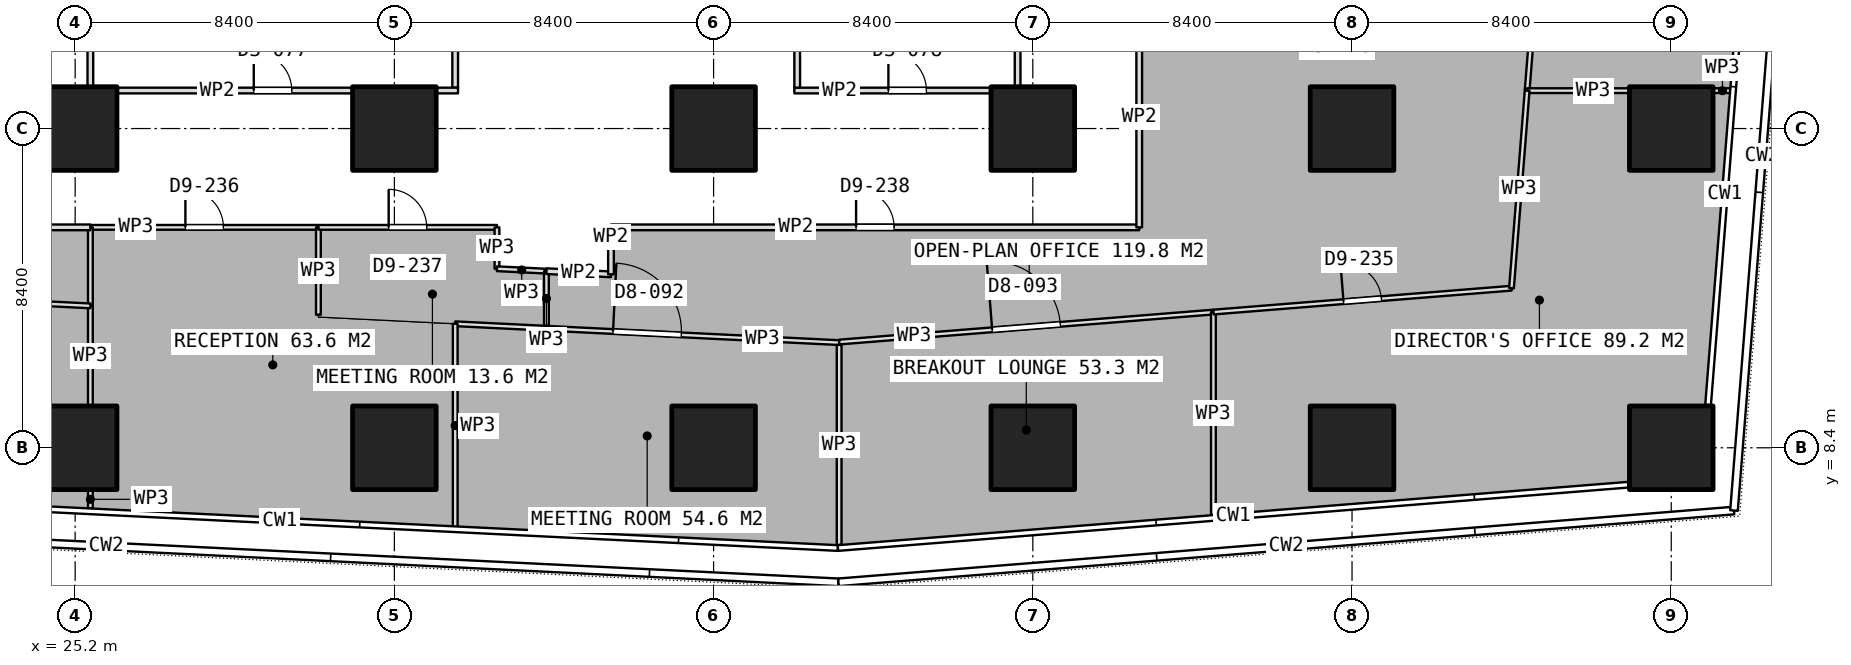
"""IFC4 building model, lengths in metres.
Left out: names, types, materials, properties, quantities, classifications, styles, units other than length and angle.
Written with IfcOpenShell. Run it as: python <this file> out.ifc"""

import sys

from ifc_helpers import new_model, si_unit, direction, frame, frame_2d, origin, origin_2d, place, context, subcontext, project, spatial, rectangle, extrude, element, fill, save


model = new_model("IFC4")
c1 = context("Model", 3, precision=1e-05, world=origin(), true_north=direction((0.0, 1.0)))
c2 = subcontext(c1, "Body", "Model", "MODEL_VIEW")
j1 = project(units=[si_unit("LENGTHUNIT", "METRE"), si_unit("PLANEANGLEUNIT", "RADIAN")], contexts=[c1])
p1 = place(None, origin())
s1 = spatial("IfcSite", under=j1, at=p1, CompositionType="ELEMENT")
p2 = place(p1, origin())
s2 = spatial("IfcBuilding", under=s1, at=p2, CompositionType="ELEMENT")
p3 = place(p2, frame((0.0, 0.0, 70.4)))
s3 = spatial("IfcBuildingStorey", under=s2, at=p3, CompositionType="ELEMENT", Elevation=70.4)
for number, where, z_axis, x_axis in (
    (1, (25.2, 8.4, 0.0), (0.0, 0.0, 1.0), (1.0, 0.0, 0.0)),
    (2, (25.2, 16.8, 0.0), (0.0, 0.0, 1.0), (1.0, 0.0, 0.0)),
    (3, (33.6, 8.4, 0.0), (0.0, 0.0, 1.0), (1.0, 0.0, 0.0)),
    (4, (33.6, 16.8, 0.0), (0.0, 0.0, 1.0), (1.0, 0.0, 0.0)),
    (5, (42.0, 8.4, 0.0), (0.0, 0.0, 1.0), (1.0, 0.0, 0.0)),
    (6, (42.0, 16.8, 0.0), (0.0, 0.0, 1.0), (1.0, 0.0, 0.0)),
    (7, (50.4, 8.4, 0.0), (0.0, 0.0, 1.0), (1.0, 0.0, 0.0)),
    (8, (50.4, 16.8, 0.0), (0.0, 0.0, 1.0), (1.0, 0.0, 0.0)),
    (9, (58.8, 8.4, 0.0), (0.0, 0.0, 1.0), (1.0, 0.0, 0.0)),
    (10, (58.8, 16.8, 0.0), (0.0, 0.0, 1.0), (1.0, 0.0, 0.0)),
    (11, (67.2, 8.4, 0.0), (0.0, 0.0, 1.0), (1.0, 0.0, 0.0)),
    (12, (67.2, 16.8, 0.0), (0.0, 0.0, 1.0), (1.0, 0.0, 0.0)),
):
    element("IfcColumn", number, at=place(p3, frame(where, z_axis=z_axis, x_axis=x_axis)), inside=s3, PredefinedType="COLUMN", context=c2, shape_type="SweptSolid", body=[
        extrude(rectangle(XDim=2.2, YDim=2.2, at=origin_2d()), origin(), (0.0, 0.0, 1.0), 3.75),
    ])
p4 = place(p3, frame((25.525, 17.8, 0.0), z_axis=(0.0, 0.0, 1.0), x_axis=(1.0, 0.0, 0.0)))
e13 = element("IfcWall", 13, at=p4, inside=s3, PredefinedType="PARTITIONING", context=c2, shape_type="SweptSolid", body=[
    extrude(rectangle(XDim=9.75, YDim=0.15, at=frame_2d((4.875, 0.0))), origin(), (0.0, 0.0, 1.0), 3.5),
])
p5 = place(p4, frame((4.375, 0.0, 0.0)))
e14 = element("IfcOpeningElement", 14, at=p5, cuts=e13, PredefinedType="OPENING", context=c2, shape_type="SweptSolid", body=[
    extrude(rectangle(XDim=1.0, YDim=2.1, at=frame_2d((0.5, 1.05))), frame((0.0, 0.085, 0.0), z_axis=(0.0, -1.0, 0.0), x_axis=(1.0, 0.0, 0.0)), (0.0, 0.0, 1.0), 0.17),
])
for number, where, z_axis, x_axis in (
    (15, (25.6, 17.875, 0.0), (0.0, 0.0, 1.0), (0.0, 1.0, 0.0)),
    (16, (35.2, 17.875, 0.0), (0.0, 0.0, 1.0), (0.0, 1.0, 0.0)),
):
    element("IfcWall", number, at=place(p3, frame(where, z_axis=z_axis, x_axis=x_axis)), inside=s3, PredefinedType="PARTITIONING", context=c2, shape_type="SweptSolid", body=[
        extrude(rectangle(XDim=2.575, YDim=0.15, at=frame_2d((1.288, 0.0))), origin(), (0.0, 0.0, 1.0), 3.5),
    ])
p6 = place(p3, frame((44.125, 17.8, 0.0), z_axis=(0.0, 0.0, 1.0), x_axis=(1.0, 0.0, 0.0)))
e17 = element("IfcWall", 17, at=p6, inside=s3, PredefinedType="PARTITIONING", context=c2, shape_type="SweptSolid", body=[
    extrude(rectangle(XDim=5.95, YDim=0.15, at=frame_2d((2.975, 0.0))), origin(), (0.0, 0.0, 1.0), 3.5),
])
p7 = place(p6, frame((2.475, 0.0, 0.0)))
e18 = element("IfcOpeningElement", 18, at=p7, cuts=e17, PredefinedType="OPENING", context=c2, shape_type="SweptSolid", body=[
    extrude(rectangle(XDim=1.0, YDim=2.1, at=frame_2d((0.5, 1.05))), frame((0.0, 0.085, 0.0), z_axis=(0.0, -1.0, 0.0), x_axis=(1.0, 0.0, 0.0)), (0.0, 0.0, 1.0), 0.17),
])
for number, where, z_axis, x_axis in (
    (19, (44.2, 17.875, 0.0), (0.0, 0.0, 1.0), (0.0, 1.0, 0.0)),
    (20, (50.0, 17.875, 0.0), (0.0, 0.0, 1.0), (0.0, 1.0, 0.0)),
):
    element("IfcWall", number, at=place(p3, frame(where, z_axis=z_axis, x_axis=x_axis)), inside=s3, PredefinedType="PARTITIONING", context=c2, shape_type="SweptSolid", body=[
        extrude(rectangle(XDim=2.575, YDim=0.15, at=frame_2d((1.288, 0.0))), origin(), (0.0, 0.0, 1.0), 3.5),
    ])
p8 = place(p3, frame((35.201, 11.663, 0.0), z_axis=(0.0, 0.0, 1.0), x_axis=(0.998797064432, -0.049034927155, 0.0)))
e21 = element("IfcWall", 21, at=p8, inside=s3, PredefinedType="PARTITIONING", context=c2, shape_type="SweptSolid", body=[
    extrude(rectangle(XDim=10.117, YDim=0.125, at=frame_2d((5.059, 0.0))), origin(), (0.0, 0.0, 1.0), 3.5),
])
p9 = place(p8, frame((4.158, 0.0, 0.0)))
e22 = element("IfcOpeningElement", 22, at=p9, cuts=e21, PredefinedType="OPENING", context=c2, shape_type="SweptSolid", body=[
    extrude(rectangle(XDim=1.8, YDim=2.1, at=frame_2d((0.9, 1.05))), frame((0.0, 0.073, 0.0), z_axis=(0.0, -1.0, 0.0), x_axis=(1.0, 0.0, 0.0)), (0.0, 0.0, 1.0), 0.145),
])
p10 = place(p3, frame((45.304, 11.107, 0.0), z_axis=(0.0, 0.0, 1.0), x_axis=(0.0, -1.0, 0.0)))
e23 = element("IfcWall", 23, at=p10, inside=s3, PredefinedType="PARTITIONING", context=c2, shape_type="SweptSolid", body=[
    extrude(rectangle(XDim=5.262, YDim=0.125, at=frame_2d((2.631, 0.0))), origin(), (0.0, 0.0, 1.0), 3.5),
])
p11 = place(p3, frame((35.201, 6.307, 0.0), z_axis=(0.0, 0.0, 1.0), x_axis=(0.0, 1.0, 0.0)))
e24 = element("IfcWall", 24, at=p11, inside=s3, PredefinedType="PARTITIONING", context=c2, shape_type="SweptSolid", body=[
    extrude(rectangle(XDim=5.356, YDim=0.125, at=frame_2d((2.678, 0.0))), origin(), (0.0, 0.0, 1.0), 3.5),
])
p12 = place(p3, frame((45.307, 11.182, 0.0), z_axis=(0.0, 0.0, 1.0), x_axis=(0.996803635633, 0.079890625164, 0.0)))
e25 = element("IfcWall", 25, at=p12, inside=s3, PredefinedType="PARTITIONING", context=c2, shape_type="SweptSolid", body=[
    extrude(rectangle(XDim=9.877, YDim=0.125, at=frame_2d((4.938, 0.0))), origin(), (0.0, 0.0, 1.0), 3.5),
])
p13 = place(p12, frame((4.037, 0.0, 0.0)))
e26 = element("IfcOpeningElement", 26, at=p13, cuts=e25, PredefinedType="OPENING", context=c2, shape_type="SweptSolid", body=[
    extrude(rectangle(XDim=1.8, YDim=2.1, at=frame_2d((0.9, 1.05))), frame((0.0, 0.073, 0.0), z_axis=(0.0, -1.0, 0.0), x_axis=(1.0, 0.0, 0.0)), (0.0, 0.0, 1.0), 0.145),
])
p14 = place(p3, frame((55.152, 11.971, 0.0), z_axis=(0.0, 0.0, 1.0), x_axis=(0.0, -1.0, 0.0)))
e27 = element("IfcWall", 27, at=p14, inside=s3, PredefinedType="PARTITIONING", context=c2, shape_type="SweptSolid", body=[
    extrude(rectangle(XDim=5.337, YDim=0.125, at=frame_2d((2.668, 0.0))), origin(), (0.0, 0.0, 1.0), 3.5),
])
p15 = place(p3, frame((63.408, 17.797, 0.0), z_axis=(0.0, 0.0, 1.0), x_axis=(1.0, 0.0, 0.0)))
e28 = element("IfcWall", 28, at=p15, inside=s3, PredefinedType="PARTITIONING", context=c2, shape_type="SweptSolid", body=[
    extrude(rectangle(XDim=2.672, YDim=0.125, at=frame_2d((1.336, 0.0))), origin(), (0.0, 0.0, 1.0), 3.5),
])
p16 = place(p3, frame((68.32, 17.797, 0.0), z_axis=(0.0, 0.0, 1.0), x_axis=(1.0, 0.0, 0.0)))
e29 = element("IfcWall", 29, at=p16, inside=s3, PredefinedType="PARTITIONING", context=c2, shape_type="SweptSolid", body=[
    extrude(rectangle(XDim=0.455, YDim=0.125, at=frame_2d((0.228, 0.0))), origin(), (0.0, 0.0, 1.0), 3.5),
])
p17 = place(p3, frame((55.153, 11.971, 0.0), z_axis=(0.0, 0.0, 1.0), x_axis=(0.996807874633, 0.079837717087, 0.0)))
e30 = element("IfcWall", 30, at=p17, inside=s3, PredefinedType="PARTITIONING", context=c2, shape_type="SweptSolid", body=[
    extrude(rectangle(XDim=7.868, YDim=0.125, at=frame_2d((3.934, 0.0))), origin(), (0.0, 0.0, 1.0), 3.5),
])
p18 = place(p17, frame((3.434, 0.0, 0.0)))
e31 = element("IfcOpeningElement", 31, at=p18, cuts=e30, PredefinedType="OPENING", context=c2, shape_type="SweptSolid", body=[
    extrude(rectangle(XDim=1.0, YDim=2.1, at=frame_2d((0.5, 1.05))), frame((0.0, 0.073, 0.0), z_axis=(0.0, -1.0, 0.0), x_axis=(1.0, 0.0, 0.0)), (0.0, 0.0, 1.0), 0.145),
])
p19 = place(p3, frame((62.996, 12.599, 0.0), z_axis=(0.0, 0.0, 1.0), x_axis=(0.078987793385, 0.996875583258, 0.0)))
e32 = element("IfcWall", 32, at=p19, inside=s3, PredefinedType="PARTITIONING", context=c2, shape_type="SweptSolid", body=[
    extrude(rectangle(XDim=5.214, YDim=0.125, at=frame_2d((2.607, 0.0))), origin(), (0.0, 0.0, 1.0), 3.5),
])
p20 = place(p3, frame((63.408, 17.798, 0.0), z_axis=(0.0, 0.0, 1.0), x_axis=(0.079179009267, 0.996860413745, 0.0)))
e33 = element("IfcWall", 33, at=p20, inside=s3, PredefinedType="PARTITIONING", context=c2, shape_type="SweptSolid", body=[
    extrude(rectangle(XDim=2.211, YDim=0.125, at=frame_2d((1.105, 0.0))), origin(), (0.0, 0.0, 1.0), 3.5),
])
p21 = place(p3, frame((25.601, 6.808, 0.0), z_axis=(0.0, 0.0, 1.0), x_axis=(0.0, 1.0, 0.0)))
e34 = element("IfcWall", 34, at=p21, inside=s3, PredefinedType="PARTITIONING", context=c2, shape_type="SweptSolid", body=[
    extrude(rectangle(XDim=0.472, YDim=0.125, at=frame_2d((0.236, 0.0))), origin(), (0.0, 0.0, 1.0), 3.5),
])
p22 = place(p3, frame((25.601, 9.52, 0.0), z_axis=(0.0, 0.0, 1.0), x_axis=(0.0, 1.0, 0.0)))
e35 = element("IfcWall", 35, at=p22, inside=s3, PredefinedType="PARTITIONING", context=c2, shape_type="SweptSolid", body=[
    extrude(rectangle(XDim=2.614, YDim=0.125, at=frame_2d((1.307, 0.0))), origin(), (0.0, 0.0, 1.0), 3.5),
])
p23 = place(p3, frame((25.601, 14.2, 0.0), z_axis=(0.0, 0.0, 1.0), x_axis=(1.0, 0.0, 0.0)))
e36 = element("IfcWall", 36, at=p23, inside=s3, PredefinedType="PARTITIONING", context=c2, shape_type="SweptSolid", body=[
    extrude(rectangle(XDim=6.0, YDim=0.125, at=frame_2d((3.0, 0.0))), origin(), (0.0, 0.0, 1.0), 3.5),
])
p24 = place(p23, frame((2.5, 0.0, 0.0)))
e37 = element("IfcOpeningElement", 37, at=p24, cuts=e36, PredefinedType="OPENING", context=c2, shape_type="SweptSolid", body=[
    extrude(rectangle(XDim=1.0, YDim=2.1, at=frame_2d((0.5, 1.05))), frame((0.0, 0.073, 0.0), z_axis=(0.0, -1.0, 0.0), x_axis=(1.0, 0.0, 0.0)), (0.0, 0.0, 1.0), 0.145),
])
p25 = place(p3, frame((31.601, 14.2, 0.0), z_axis=(0.0, 0.0, 1.0), x_axis=(0.0, -1.0, 0.0)))
e38 = element("IfcWall", 38, at=p25, inside=s3, PredefinedType="PARTITIONING", context=c2, shape_type="SweptSolid", body=[
    extrude(rectangle(XDim=2.298, YDim=0.125, at=frame_2d((1.149, 0.0))), origin(), (0.0, 0.0, 1.0), 3.5),
])
p26 = place(p3, frame((25.601, 12.134, 0.0), z_axis=(0.0, 0.0, 1.0), x_axis=(0.0, 1.0, 0.0)))
e39 = element("IfcWall", 39, at=p26, inside=s3, PredefinedType="PARTITIONING", context=c2, shape_type="SweptSolid", body=[
    extrude(rectangle(XDim=2.066, YDim=0.125, at=frame_2d((1.033, 0.0))), origin(), (0.0, 0.0, 1.0), 3.5),
])
p27 = place(p3, frame((31.601, 14.2, 0.0), z_axis=(0.0, 0.0, 1.0), x_axis=(1.0, 0.0, 0.0)))
e40 = element("IfcWall", 40, at=p27, inside=s3, PredefinedType="PARTITIONING", context=c2, shape_type="SweptSolid", body=[
    extrude(rectangle(XDim=4.699, YDim=0.125, at=frame_2d((2.35, 0.0))), origin(), (0.0, 0.0, 1.0), 3.5),
])
p28 = place(p27, frame((1.849, 0.0, 0.0)))
e41 = element("IfcOpeningElement", 41, at=p28, cuts=e40, PredefinedType="OPENING", context=c2, shape_type="SweptSolid", body=[
    extrude(rectangle(XDim=1.0, YDim=2.1, at=frame_2d((0.5, 1.05))), frame((0.0, 0.073, 0.0), z_axis=(0.0, -1.0, 0.0), x_axis=(1.0, 0.0, 0.0)), (0.0, 0.0, 1.0), 0.145),
])
p29 = place(p3, frame((36.3, 14.2, 0.0), z_axis=(0.0, 0.0, 1.0), x_axis=(0.0, -1.0, 0.0)))
e42 = element("IfcWall", 42, at=p29, inside=s3, PredefinedType="PARTITIONING", context=c2, shape_type="SweptSolid", body=[
    extrude(rectangle(XDim=1.089, YDim=0.125, at=frame_2d((0.544, 0.0))), origin(), (0.0, 0.0, 1.0), 3.5),
])
p30 = place(p3, frame((36.3, 13.111, 0.0), z_axis=(0.0, 0.0, 1.0), x_axis=(0.998793590669, -0.049105633469, 0.0)))
e43 = element("IfcWall", 43, at=p30, inside=s3, PredefinedType="PARTITIONING", context=c2, shape_type="SweptSolid", body=[
    extrude(rectangle(XDim=1.302, YDim=0.125, at=frame_2d((0.651, 0.0))), origin(), (0.0, 0.0, 1.0), 3.5),
])
p31 = place(p3, frame((37.601, 13.047, 0.0), z_axis=(0.0, 0.0, 1.0), x_axis=(0.0, -1.0, 0.0)))
e44 = element("IfcWall", 44, at=p31, inside=s3, PredefinedType="PARTITIONING", context=c2, shape_type="SweptSolid", body=[
    extrude(rectangle(XDim=1.439, YDim=0.125, at=frame_2d((0.72, 0.0))), origin(), (0.0, 0.0, 1.0), 3.5),
])
p32 = place(p3, frame((37.601, 13.047, 0.0), z_axis=(0.0, 0.0, 1.0), x_axis=(0.998808600268, -0.048799385557, 0.0)))
e45 = element("IfcWall", 45, at=p32, inside=s3, PredefinedType="PARTITIONING", context=c2, shape_type="SweptSolid", body=[
    extrude(rectangle(XDim=1.701, YDim=0.15, at=frame_2d((0.851, 0.0))), origin(), (0.0, 0.0, 1.0), 3.5),
])
p33 = place(p3, frame((39.3, 12.964, 0.0), z_axis=(0.0, 0.0, 1.0), x_axis=(0.0, 1.0, 0.0)))
e46 = element("IfcWall", 46, at=p33, inside=s3, PredefinedType="PARTITIONING", context=c2, shape_type="SweptSolid", body=[
    extrude(rectangle(XDim=1.236, YDim=0.15, at=frame_2d((0.618, 0.0))), origin(), (0.0, 0.0, 1.0), 3.5),
])
p34 = place(p3, frame((39.3, 14.2, 0.0), z_axis=(0.0, 0.0, 1.0), x_axis=(1.0, 0.0, 0.0)))
e47 = element("IfcWall", 47, at=p34, inside=s3, PredefinedType="PARTITIONING", context=c2, shape_type="SweptSolid", body=[
    extrude(rectangle(XDim=13.9, YDim=0.15, at=frame_2d((6.95, 0.0))), origin(), (0.0, 0.0, 1.0), 3.5),
])
p35 = place(p34, frame((6.45, 0.0, 0.0)))
e48 = element("IfcOpeningElement", 48, at=p35, cuts=e47, PredefinedType="OPENING", context=c2, shape_type="SweptSolid", body=[
    extrude(rectangle(XDim=1.0, YDim=2.1, at=frame_2d((0.5, 1.05))), frame((0.0, 0.085, 0.0), z_axis=(0.0, -1.0, 0.0), x_axis=(1.0, 0.0, 0.0)), (0.0, 0.0, 1.0), 0.17),
])
p36 = place(p3, frame((53.2, 14.2, 0.0), z_axis=(0.0, 0.0, 1.0), x_axis=(0.0, 1.0, 0.0)))
e49 = element("IfcWall", 49, at=p36, inside=s3, PredefinedType="PARTITIONING", context=c2, shape_type="SweptSolid", body=[
    extrude(rectangle(XDim=5.802, YDim=0.15, at=frame_2d((2.901, 0.0))), origin(), (0.0, 0.0, 1.0), 3.5),
])
p37 = place(p3, frame((15.941, 12.609, 0.0), z_axis=(0.0, 0.0, 1.0), x_axis=(0.998793791176, -0.049101555046, 0.0)))
e50 = element("IfcWall", 50, at=p37, inside=s3, PredefinedType="PARTITIONING", context=c2, shape_type="SweptSolid", body=[
    extrude(rectangle(XDim=9.671, YDim=0.125, at=frame_2d((4.835, 0.0))), origin(), (0.0, 0.0, 1.0), 3.5),
])
p38 = place(p37, frame((3.935, 0.0, 0.0)))
e51 = element("IfcOpeningElement", 51, at=p38, cuts=e50, PredefinedType="OPENING", context=c2, shape_type="SweptSolid", body=[
    extrude(rectangle(XDim=1.8, YDim=2.1, at=frame_2d((0.9, 1.05))), frame((0.0, 0.073, 0.0), z_axis=(0.0, -1.0, 0.0), x_axis=(1.0, 0.0, 0.0)), (0.0, 0.0, 1.0), 0.145),
])
p39 = place(p3, frame((22.4, 14.2, 0.0), z_axis=(0.0, 0.0, 1.0), x_axis=(1.0, 0.0, 0.0)))
e52 = element("IfcWall", 52, at=p39, inside=s3, PredefinedType="PARTITIONING", context=c2, shape_type="SweptSolid", body=[
    extrude(rectangle(XDim=3.2, YDim=0.15, at=frame_2d((1.6, 0.0))), origin(), (0.0, 0.0, 1.0), 3.5),
])
p40 = place(p5, origin())
e53 = element("IfcDoor", 53, at=p40, inside=s3, OperationType="SINGLE_SWING_LEFT", PredefinedType="DOOR", context=c2, shape_type="SweptSolid", body=[
    extrude(rectangle(XDim=1.0, YDim=2.1, at=frame_2d((0.5, 1.05))), frame((0.0, 0.025, 0.0), z_axis=(0.0, -1.0, 0.0), x_axis=(1.0, 0.0, 0.0)), (0.0, 0.0, 1.0), 0.05),
])
fill(e14, e53)
p41 = place(p7, origin())
e54 = element("IfcDoor", 54, at=p41, inside=s3, OperationType="SINGLE_SWING_LEFT", PredefinedType="DOOR", context=c2, shape_type="SweptSolid", body=[
    extrude(rectangle(XDim=1.0, YDim=2.1, at=frame_2d((0.5, 1.05))), frame((0.0, 0.025, 0.0), z_axis=(0.0, -1.0, 0.0), x_axis=(1.0, 0.0, 0.0)), (0.0, 0.0, 1.0), 0.05),
])
fill(e18, e54)
p42 = place(p9, origin())
e55 = element("IfcDoor", 55, at=p42, inside=s3, OperationType="DOUBLE_DOOR_SINGLE_SWING", PredefinedType="DOOR", context=c2, shape_type="SweptSolid", body=[
    extrude(rectangle(XDim=1.8, YDim=2.1, at=frame_2d((0.9, 1.05))), frame((0.0, 0.025, 0.0), z_axis=(0.0, -1.0, 0.0), x_axis=(1.0, 0.0, 0.0)), (0.0, 0.0, 1.0), 0.05),
])
fill(e22, e55)
p43 = place(p13, origin())
e56 = element("IfcDoor", 56, at=p43, inside=s3, OperationType="DOUBLE_DOOR_SINGLE_SWING", PredefinedType="DOOR", context=c2, shape_type="SweptSolid", body=[
    extrude(rectangle(XDim=1.8, YDim=2.1, at=frame_2d((0.9, 1.05))), frame((0.0, 0.025, 0.0), z_axis=(0.0, -1.0, 0.0), x_axis=(1.0, 0.0, 0.0)), (0.0, 0.0, 1.0), 0.05),
])
fill(e26, e56)
p44 = place(p18, origin())
e57 = element("IfcDoor", 57, at=p44, inside=s3, OperationType="SINGLE_SWING_LEFT", PredefinedType="DOOR", context=c2, shape_type="SweptSolid", body=[
    extrude(rectangle(XDim=1.0, YDim=2.1, at=frame_2d((0.5, 1.05))), frame((0.0, 0.025, 0.0), z_axis=(0.0, -1.0, 0.0), x_axis=(1.0, 0.0, 0.0)), (0.0, 0.0, 1.0), 0.05),
])
fill(e31, e57)
p45 = place(p24, origin())
e58 = element("IfcDoor", 58, at=p45, inside=s3, OperationType="SINGLE_SWING_LEFT", PredefinedType="DOOR", context=c2, shape_type="SweptSolid", body=[
    extrude(rectangle(XDim=1.0, YDim=2.1, at=frame_2d((0.5, 1.05))), frame((0.0, 0.025, 0.0), z_axis=(0.0, -1.0, 0.0), x_axis=(1.0, 0.0, 0.0)), (0.0, 0.0, 1.0), 0.05),
])
fill(e37, e58)
p46 = place(p28, origin())
e59 = element("IfcDoor", 59, at=p46, inside=s3, OperationType="SINGLE_SWING_LEFT", PredefinedType="DOOR", context=c2, shape_type="SweptSolid", body=[
    extrude(rectangle(XDim=1.0, YDim=2.1, at=frame_2d((0.5, 1.05))), frame((0.0, 0.025, 0.0), z_axis=(0.0, -1.0, 0.0), x_axis=(1.0, 0.0, 0.0)), (0.0, 0.0, 1.0), 0.05),
])
fill(e41, e59)
p47 = place(p35, origin())
e60 = element("IfcDoor", 60, at=p47, inside=s3, OperationType="SINGLE_SWING_LEFT", PredefinedType="DOOR", context=c2, shape_type="SweptSolid", body=[
    extrude(rectangle(XDim=1.0, YDim=2.1, at=frame_2d((0.5, 1.05))), frame((0.0, 0.025, 0.0), z_axis=(0.0, -1.0, 0.0), x_axis=(1.0, 0.0, 0.0)), (0.0, 0.0, 1.0), 0.05),
])
fill(e48, e60)
save(model, sys.argv[1])
